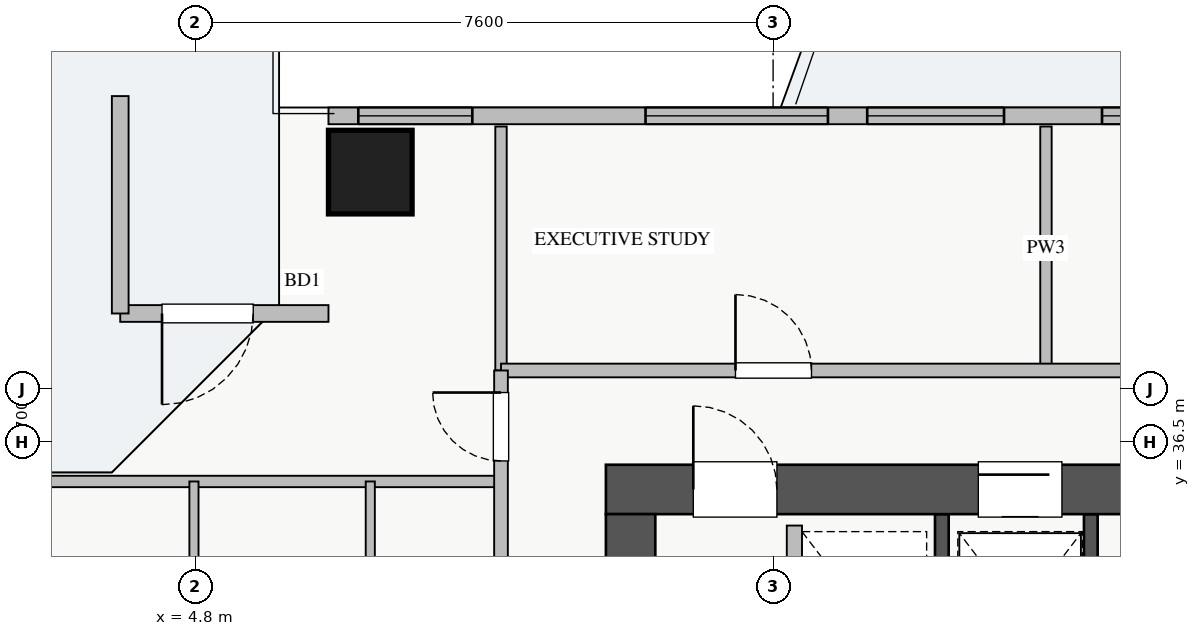
"""IFC4 building model, lengths in metres.
Left out: names, types, materials, properties, quantities, classifications, styles, units other than length and angle.
Written with IfcOpenShell. Run it as: python <this file> out.ifc"""

import sys

from ifc_helpers import new_model, si_unit, direction, frame, frame_2d, origin, origin_2d, place, context, subcontext, project, spatial, rectangle, extrude, source, transform, mapped, element, fill, save


model = new_model("IFC4")
c1 = context("Model", 3, precision=1e-05, world=origin(), true_north=direction((0.0, 1.0)))
c2 = subcontext(c1, "Body", "Model", "MODEL_VIEW")
j1 = project(units=[si_unit("LENGTHUNIT", "METRE"), si_unit("PLANEANGLEUNIT", "RADIAN")], contexts=[c1])
p1 = place(None, origin())
s1 = spatial("IfcSite", under=j1, at=p1, CompositionType="ELEMENT")
p2 = place(p1, origin())
s2 = spatial("IfcBuilding", under=s1, at=p2, CompositionType="ELEMENT")
p3 = place(p2, frame((0.0, 0.0, 132.75)))
s3 = spatial("IfcBuildingStorey", under=s2, at=p3, CompositionType="ELEMENT", Elevation=132.75)
for number, where, z_axis, x_axis in (
    (1, (14.62, 33.2, 0.0), (0.0, 0.0, 1.0), (0.0, 1.0, 0.0)),
    (2, (16.58, 33.2, 0.0), (0.0, 0.0, 1.0), (0.0, 1.0, 0.0)),
):
    element("IfcWall", number, at=place(p3, frame(where, z_axis=z_axis, x_axis=x_axis)), inside=s3, PredefinedType="SHEAR", context=c2, shape_type="SweptSolid", body=[
        extrude(rectangle(XDim=2.35, YDim=0.18, at=frame_2d((1.175, 0.0))), origin(), (0.0, 0.0, 1.0), 3.07),
    ])
p4 = place(p3, frame((10.2, 35.875, 0.0), z_axis=(0.0, 0.0, 1.0), x_axis=(1.0, 0.0, 0.0)))
e3 = element("IfcWall", 3, at=p4, inside=s3, PredefinedType="SHEAR", context=c2, shape_type="SweptSolid", body=[
    extrude(rectangle(XDim=17.6, YDim=0.65, at=frame_2d((8.8, 0.0))), origin(), (0.0, 0.0, 1.0), 3.25),
])
p5 = place(p4, frame((1.15, 0.0, 0.0)))
e4 = element("IfcOpeningElement", 4, at=p5, cuts=e3, PredefinedType="OPENING", context=c2, shape_type="SweptSolid", body=[
    extrude(rectangle(XDim=1.1, YDim=2.05, at=frame_2d((0.55, 1.025))), frame((0.0, 0.335, 0.0), z_axis=(0.0, -1.0, 0.0), x_axis=(1.0, 0.0, 0.0)), (0.0, 0.0, 1.0), 0.67),
])
p6 = place(p4, frame((8.3, 0.0, 0.0)))
e5 = element("IfcOpeningElement", 5, at=p6, cuts=e3, PredefinedType="OPENING", context=c2, shape_type="SweptSolid", body=[
    extrude(rectangle(XDim=1.1, YDim=2.05, at=frame_2d((0.55, 1.025))), frame((0.0, 0.335, 0.0), z_axis=(0.0, -1.0, 0.0), x_axis=(1.0, 0.0, 0.0)), (0.0, 0.0, 1.0), 0.67),
])
p7 = place(p4, frame((4.9, 0.0, 0.0)))
e6 = element("IfcOpeningElement", 6, at=p7, cuts=e3, PredefinedType="OPENING", context=c2, shape_type="SweptSolid", body=[
    extrude(rectangle(XDim=1.1, YDim=2.05, at=frame_2d((0.55, 1.025))), frame((0.0, 0.335, 0.0), z_axis=(0.0, -1.0, 0.0), x_axis=(1.0, 0.0, 0.0)), (0.0, 0.0, 1.0), 0.67),
])
p8 = place(p4, frame((14.74, 0.0, 0.0)))
e7 = element("IfcOpeningElement", 7, at=p8, cuts=e3, PredefinedType="OPENING", context=c2, shape_type="SweptSolid", body=[
    extrude(rectangle(XDim=1.0, YDim=2.05, at=frame_2d((0.5, 1.025))), frame((0.0, 0.335, 0.0), z_axis=(0.0, -1.0, 0.0), x_axis=(1.0, 0.0, 0.0)), (0.0, 0.0, 1.0), 0.67),
])
p9 = place(p4, frame((10.005, 0.0, 0.0)))
e8 = element("IfcOpeningElement", 8, at=p9, cuts=e3, PredefinedType="OPENING", context=c2, shape_type="SweptSolid", body=[
    extrude(rectangle(XDim=1.0, YDim=2.05, at=frame_2d((0.5, 1.025))), frame((0.0, 0.335, 0.0), z_axis=(0.0, -1.0, 0.0), x_axis=(1.0, 0.0, 0.0)), (0.0, 0.0, 1.0), 0.67),
])
p10 = place(p4, frame((11.55, 0.0, 0.0)))
e9 = element("IfcOpeningElement", 9, at=p10, cuts=e3, PredefinedType="OPENING", context=c2, shape_type="SweptSolid", body=[
    extrude(rectangle(XDim=1.0, YDim=2.05, at=frame_2d((0.5, 1.025))), frame((0.0, 0.335, 0.0), z_axis=(0.0, -1.0, 0.0), x_axis=(1.0, 0.0, 0.0)), (0.0, 0.0, 1.0), 0.67),
])
p11 = place(p4, frame((13.215, 0.0, 0.0)))
e10 = element("IfcOpeningElement", 10, at=p11, cuts=e3, PredefinedType="OPENING", context=c2, shape_type="SweptSolid", body=[
    extrude(rectangle(XDim=1.0, YDim=2.05, at=frame_2d((0.5, 1.025))), frame((0.0, 0.335, 0.0), z_axis=(0.0, -1.0, 0.0), x_axis=(1.0, 0.0, 0.0)), (0.0, 0.0, 1.0), 0.67),
])
p12 = place(p3, frame((10.525, 29.65, 0.0), z_axis=(0.0, 0.0, 1.0), x_axis=(0.0, 1.0, 0.0)))
e11 = element("IfcWall", 11, at=p12, inside=s3, PredefinedType="SHEAR", context=c2, shape_type="SweptSolid", body=[
    extrude(rectangle(XDim=5.9, YDim=0.65, at=frame_2d((2.95, 0.0))), origin(), (0.0, 0.0, 1.0), 3.25),
])
m1 = source(origin(), c2, "Body", "SweptSolid", [
    extrude(rectangle(XDim=1.1, YDim=1.1, at=origin_2d()), origin(), (0.0, 0.0, 1.0), 3.25),
])
p13 = place(p3, frame((7.1, 40.05, 0.0), z_axis=(0.0, 0.0, 1.0), x_axis=(1.0, 0.0, 0.0)))
e12 = element("IfcColumn", 12, at=p13, inside=s3, PredefinedType="COLUMN", context=c2, shape_type="MappedRepresentation", body=[
    mapped(m1, transform((0.0, 0.0, 0.0), x_axis=(1.0, 0.0, 0.0), y_axis=(0.0, 1.0, 0.0), z_axis=(0.0, 0.0, 1.0), scale=1.0)),
])
p14 = place(p3, frame((6.55, 40.79, 0.0), z_axis=(0.0, 0.0, 1.0), x_axis=(1.0, 0.0, 0.0)))
e13 = element("IfcWall", 13, at=p14, inside=s3, PredefinedType="STANDARD", context=c2, shape_type="SweptSolid", body=[
    extrude(rectangle(XDim=24.9, YDim=0.22, at=frame_2d((12.45, 0.0))), origin(), (0.0, 0.0, 1.0), 2.61),
])
p15 = place(p14, frame((13.3, 0.0, 0.0)))
e14 = element("IfcOpeningElement", 14, at=p15, cuts=e13, PredefinedType="OPENING", context=c2, shape_type="SweptSolid", body=[
    extrude(rectangle(XDim=1.2, YDim=2.1, at=frame_2d((0.6, 1.05))), frame((0.0, 0.12, 0.0), z_axis=(0.0, -1.0, 0.0), x_axis=(1.0, 0.0, 0.0)), (0.0, 0.0, 1.0), 0.24),
])
p16 = place(p14, frame((0.393, 0.0, 0.9)))
e15 = element("IfcOpeningElement", 15, at=p16, cuts=e13, PredefinedType="OPENING", context=c2, shape_type="SweptSolid", body=[
    extrude(rectangle(XDim=1.5, YDim=1.5, at=frame_2d((0.75, 0.75))), frame((0.0, 0.12, 0.0), z_axis=(0.0, -1.0, 0.0), x_axis=(1.0, 0.0, 0.0)), (0.0, 0.0, 1.0), 0.24),
])
p17 = place(p14, frame((7.088, 0.0, 0.9)))
e16 = element("IfcOpeningElement", 16, at=p17, cuts=e13, PredefinedType="OPENING", context=c2, shape_type="SweptSolid", body=[
    extrude(rectangle(XDim=1.8, YDim=1.5, at=frame_2d((0.9, 0.75))), frame((0.0, 0.12, 0.0), z_axis=(0.0, -1.0, 0.0), x_axis=(1.0, 0.0, 0.0)), (0.0, 0.0, 1.0), 0.24),
])
p18 = place(p14, frame((14.813, 0.0, 0.9)))
e17 = element("IfcOpeningElement", 17, at=p18, cuts=e13, PredefinedType="OPENING", context=c2, shape_type="SweptSolid", body=[
    extrude(rectangle(XDim=1.5, YDim=1.45, at=frame_2d((0.75, 0.725))), frame((0.0, 0.12, 0.0), z_axis=(0.0, -1.0, 0.0), x_axis=(1.0, 0.0, 0.0)), (0.0, 0.0, 1.0), 0.24),
])
p19 = place(p14, frame((20.738, 0.0, 0.9)))
e18 = element("IfcOpeningElement", 18, at=p19, cuts=e13, PredefinedType="OPENING", context=c2, shape_type="SweptSolid", body=[
    extrude(rectangle(XDim=2.1, YDim=1.48, at=frame_2d((1.05, 0.74))), frame((0.0, 0.12, 0.0), z_axis=(0.0, -1.0, 0.0), x_axis=(1.0, 0.0, 0.0)), (0.0, 0.0, 1.0), 0.24),
])
p20 = place(p14, frame((4.171, 0.0, 0.9)))
e19 = element("IfcOpeningElement", 19, at=p20, cuts=e13, PredefinedType="OPENING", context=c2, shape_type="SweptSolid", body=[
    extrude(rectangle(XDim=2.4, YDim=1.5, at=frame_2d((1.2, 0.75))), frame((0.0, 0.12, 0.0), z_axis=(0.0, -1.0, 0.0), x_axis=(1.0, 0.0, 0.0)), (0.0, 0.0, 1.0), 0.24),
])
p21 = place(p14, frame((10.177, 0.0, 0.9)))
e20 = element("IfcOpeningElement", 20, at=p21, cuts=e13, PredefinedType="OPENING", context=c2, shape_type="SweptSolid", body=[
    extrude(rectangle(XDim=2.4, YDim=1.5, at=frame_2d((1.2, 0.75))), frame((0.0, 0.12, 0.0), z_axis=(0.0, -1.0, 0.0), x_axis=(1.0, 0.0, 0.0)), (0.0, 0.0, 1.0), 0.24),
])
p22 = place(p3, frame((3.81, 38.19, 0.0), z_axis=(0.0, 0.0, 1.0), x_axis=(1.0, 0.0, 0.0)))
e21 = element("IfcWall", 21, at=p22, inside=s3, PredefinedType="STANDARD", context=c2, shape_type="SweptSolid", body=[
    extrude(rectangle(XDim=2.74, YDim=0.22, at=frame_2d((1.37, 0.0))), origin(), (0.0, 0.0, 1.0), 2.61),
])
p23 = place(p22, frame((0.55, 0.0, 0.0)))
e22 = element("IfcOpeningElement", 22, at=p23, cuts=e21, PredefinedType="OPENING", context=c2, shape_type="SweptSolid", body=[
    extrude(rectangle(XDim=1.2, YDim=2.1, at=frame_2d((0.6, 1.05))), frame((0.0, 0.12, 0.0), z_axis=(0.0, -1.0, 0.0), x_axis=(1.0, 0.0, 0.0)), (0.0, 0.0, 1.0), 0.24),
])
p24 = place(p3, frame((3.81, 38.19, 0.0), z_axis=(0.0, 0.0, 1.0), x_axis=(0.0, 1.0, 0.0)))
e23 = element("IfcWall", 23, at=p24, inside=s3, PredefinedType="STANDARD", context=c2, shape_type="SweptSolid", body=[
    extrude(rectangle(XDim=2.86, YDim=0.22, at=frame_2d((1.43, 0.0))), origin(), (0.0, 0.0, 1.0), 2.61),
])
p25 = place(p3, frame((12.68, 33.19, 0.0), z_axis=(0.0, 0.0, 1.0), x_axis=(0.0, 1.0, 0.0)))
e24 = element("IfcWall", 24, at=p25, inside=s3, PredefinedType="PARTITIONING", context=c2, shape_type="SweptSolid", body=[
    extrude(rectangle(XDim=2.21, YDim=0.2, at=frame_2d((1.105, 0.0))), origin(), (0.0, 0.0, 1.0), 3.07),
])
p26 = place(p3, frame((15.99, 37.44, 0.0), z_axis=(0.0, 0.0, 1.0), x_axis=(0.0, 1.0, 0.0)))
e25 = element("IfcWall", 25, at=p26, inside=s3, PredefinedType="PARTITIONING", context=c2, shape_type="SweptSolid", body=[
    extrude(rectangle(XDim=3.21, YDim=0.15, at=frame_2d((1.605, 0.0))), origin(), (0.0, 0.0, 1.0), 2.771),
])
p27 = place(p3, frame((8.82, 37.44, 0.0), z_axis=(0.0, 0.0, 1.0), x_axis=(0.0, 1.0, 0.0)))
e26 = element("IfcWall", 26, at=p27, inside=s3, PredefinedType="PARTITIONING", context=c2, shape_type="SweptSolid", body=[
    extrude(rectangle(XDim=3.21, YDim=0.15, at=frame_2d((1.605, 0.0))), origin(), (0.0, 0.0, 1.0), 3.07),
])
p28 = place(p3, frame((8.82, 37.44, 0.0), z_axis=(0.0, 0.0, 1.0), x_axis=(1.0, 0.0, 0.0)))
e27 = element("IfcWall", 27, at=p28, inside=s3, PredefinedType="PARTITIONING", context=c2, shape_type="SweptSolid", body=[
    extrude(rectangle(XDim=23.58, YDim=0.18, at=frame_2d((11.79, 0.0))), origin(), (0.0, 0.0, 1.0), 3.07),
])
p29 = place(p28, frame((3.085, 0.0, 0.0)))
e28 = element("IfcOpeningElement", 28, at=p29, cuts=e27, PredefinedType="OPENING", context=c2, shape_type="SweptSolid", body=[
    extrude(rectangle(XDim=1.0, YDim=2.05, at=frame_2d((0.5, 1.025))), frame((0.0, 0.1, 0.0), z_axis=(0.0, -1.0, 0.0), x_axis=(1.0, 0.0, 0.0)), (0.0, 0.0, 1.0), 0.2),
])
p30 = place(p28, frame((10.805, 0.0, 0.0)))
e29 = element("IfcOpeningElement", 29, at=p30, cuts=e27, PredefinedType="OPENING", context=c2, shape_type="SweptSolid", body=[
    extrude(rectangle(XDim=1.0, YDim=2.05, at=frame_2d((0.5, 1.025))), frame((0.0, 0.1, 0.0), z_axis=(0.0, -1.0, 0.0), x_axis=(1.0, 0.0, 0.0)), (0.0, 0.0, 1.0), 0.2),
])
p31 = place(p28, frame((18.8, 0.0, 0.0)))
e30 = element("IfcOpeningElement", 30, at=p31, cuts=e27, PredefinedType="OPENING", context=c2, shape_type="SweptSolid", body=[
    extrude(rectangle(XDim=1.0, YDim=2.05, at=frame_2d((0.5, 1.025))), frame((0.0, 0.1, 0.0), z_axis=(0.0, -1.0, 0.0), x_axis=(1.0, 0.0, 0.0)), (0.0, 0.0, 1.0), 0.2),
])
p32 = place(p3, frame((1.35, 35.98, 0.0), z_axis=(0.0, 0.0, 1.0), x_axis=(1.0, 0.0, 0.0)))
e31 = element("IfcWall", 31, at=p32, inside=s3, PredefinedType="PARTITIONING", context=c2, shape_type="SweptSolid", body=[
    extrude(rectangle(XDim=7.47, YDim=0.15, at=frame_2d((3.735, 0.0))), origin(), (0.0, 0.0, 1.0), 3.07),
])
p33 = place(p3, frame((4.78, 28.79, 0.0), z_axis=(0.0, 0.0, 1.0), x_axis=(0.0, 1.0, 0.0)))
e32 = element("IfcWall", 32, at=p33, inside=s3, PredefinedType="PLUMBINGWALL", context=c2, shape_type="SweptSolid", body=[
    extrude(rectangle(XDim=7.19, YDim=0.12, at=frame_2d((3.595, 0.0))), origin(), (0.0, 0.0, 1.0), 3.07),
])
p34 = place(p3, frame((7.1, 28.79, 0.0), z_axis=(0.0, 0.0, 1.0), x_axis=(0.0, 1.0, 0.0)))
e33 = element("IfcWall", 33, at=p34, inside=s3, PredefinedType="PLUMBINGWALL", context=c2, shape_type="SweptSolid", body=[
    extrude(rectangle(XDim=7.19, YDim=0.12, at=frame_2d((3.595, 0.0))), origin(), (0.0, 0.0, 1.0), 2.577),
])
p35 = place(p3, frame((8.82, 8.31, 0.0), z_axis=(0.0, 0.0, 1.0), x_axis=(0.0, 1.0, 0.0)))
e34 = element("IfcWall", 34, at=p35, inside=s3, PredefinedType="PARTITIONING", context=c2, shape_type="SweptSolid", body=[
    extrude(rectangle(XDim=29.13, YDim=0.18, at=frame_2d((14.565, 0.0))), origin(), (0.0, 0.0, 1.0), 3.07),
])
p36 = place(p35, frame((27.94, 0.0, 0.0)))
e35 = element("IfcOpeningElement", 35, at=p36, cuts=e34, PredefinedType="OPENING", context=c2, shape_type="SweptSolid", body=[
    extrude(rectangle(XDim=0.9, YDim=2.05, at=frame_2d((0.45, 1.025))), frame((0.0, 0.1, 0.0), z_axis=(0.0, -1.0, 0.0), x_axis=(1.0, 0.0, 0.0)), (0.0, 0.0, 1.0), 0.2),
])
p37 = place(p35, frame((0.24, 0.0, 0.0)))
e36 = element("IfcOpeningElement", 36, at=p37, cuts=e34, PredefinedType="OPENING", context=c2, shape_type="SweptSolid", body=[
    extrude(rectangle(XDim=0.9, YDim=2.05, at=frame_2d((0.45, 1.025))), frame((0.0, 0.1, 0.0), z_axis=(0.0, -1.0, 0.0), x_axis=(1.0, 0.0, 0.0)), (0.0, 0.0, 1.0), 0.2),
])
p38 = place(p35, frame((7.105, 0.0, 0.0)))
e37 = element("IfcOpeningElement", 37, at=p38, cuts=e34, PredefinedType="OPENING", context=c2, shape_type="SweptSolid", body=[
    extrude(rectangle(XDim=1.0, YDim=2.05, at=frame_2d((0.5, 1.025))), frame((0.0, 0.1, 0.0), z_axis=(0.0, -1.0, 0.0), x_axis=(1.0, 0.0, 0.0)), (0.0, 0.0, 1.0), 0.2),
])
p39 = place(p35, frame((16.475, 0.0, 0.0)))
e38 = element("IfcOpeningElement", 38, at=p39, cuts=e34, PredefinedType="OPENING", context=c2, shape_type="SweptSolid", body=[
    extrude(rectangle(XDim=1.0, YDim=2.05, at=frame_2d((0.5, 1.025))), frame((0.0, 0.1, 0.0), z_axis=(0.0, -1.0, 0.0), x_axis=(1.0, 0.0, 0.0)), (0.0, 0.0, 1.0), 0.2),
])
m2 = source(origin(), c2, "Body", "SweptSolid", [
    extrude(rectangle(XDim=1.5, YDim=1.5, at=frame_2d((0.75, 0.75))), frame((0.0, 0.03, 0.0), z_axis=(0.0, -1.0, 0.0), x_axis=(1.0, 0.0, 0.0)), (0.0, 0.0, 1.0), 0.06),
])
p40 = place(p16, origin())
e39 = element("IfcWindow", 39, at=p40, inside=s3, PartitioningType="TRIPLE_PANEL_VERTICAL", PredefinedType="WINDOW", context=c2, shape_type="MappedRepresentation", body=[
    mapped(m2, transform((0.0, 0.0, 0.0), x_axis=(1.0, 0.0, 0.0), y_axis=(0.0, 1.0, 0.0), z_axis=(0.0, 0.0, 1.0), scale=1.0)),
])
fill(e15, e39)
m3 = source(origin(), c2, "Body", "SweptSolid", [
    extrude(rectangle(XDim=1.8, YDim=1.5, at=frame_2d((0.9, 0.75))), frame((0.0, 0.03, 0.0), z_axis=(0.0, -1.0, 0.0), x_axis=(1.0, 0.0, 0.0)), (0.0, 0.0, 1.0), 0.06),
])
p41 = place(p17, origin())
e40 = element("IfcWindow", 40, at=p41, inside=s3, PartitioningType="DOUBLE_PANEL_VERTICAL", PredefinedType="WINDOW", context=c2, shape_type="MappedRepresentation", body=[
    mapped(m3, transform((0.0, 0.0, 0.0), x_axis=(1.0, 0.0, 0.0), y_axis=(0.0, 1.0, 0.0), z_axis=(0.0, 0.0, 1.0), scale=1.0)),
])
fill(e16, e40)
m4 = source(origin(), c2, "Body", "SweptSolid", [
    extrude(rectangle(XDim=1.2, YDim=2.1, at=frame_2d((0.6, 1.05))), frame((0.0, 0.025, 0.0), z_axis=(0.0, -1.0, 0.0), x_axis=(1.0, 0.0, 0.0)), (0.0, 0.0, 1.0), 0.05),
])
p42 = place(p23, frame((1.2, 0.0, 0.0), z_axis=(0.0, 0.0, 1.0), x_axis=(-1.0, 0.0, 0.0)))
e41 = element("IfcDoor", 41, at=p42, inside=s3, OperationType="SINGLE_SWING_LEFT", PredefinedType="DOOR", context=c2, shape_type="MappedRepresentation", body=[
    mapped(m4, transform((0.0, 0.0, 0.0), x_axis=(1.0, 0.0, 0.0), y_axis=(0.0, 1.0, 0.0), z_axis=(0.0, 0.0, 1.0), scale=1.0)),
])
fill(e22, e41)
m5 = source(origin(), c2, "Body", "SweptSolid", [
    extrude(rectangle(XDim=1.1, YDim=2.05, at=frame_2d((0.55, 1.025))), frame((0.0, 0.025, 0.0), z_axis=(0.0, -1.0, 0.0), x_axis=(1.0, 0.0, 0.0)), (0.0, 0.0, 1.0), 0.05),
])
p43 = place(p5, origin())
e42 = element("IfcDoor", 42, at=p43, inside=s3, OperationType="SINGLE_SWING_LEFT", PredefinedType="DOOR", context=c2, shape_type="MappedRepresentation", body=[
    mapped(m5, transform((0.0, 0.0, 0.0), x_axis=(1.0, 0.0, 0.0), y_axis=(0.0, 1.0, 0.0), z_axis=(0.0, 0.0, 1.0), scale=1.0)),
])
fill(e4, e42)
p44 = place(p7, origin())
e43 = element("IfcDoor", 43, at=p44, inside=s3, OperationType="SLIDING_TO_LEFT", PredefinedType="DOOR", context=c2, shape_type="MappedRepresentation", body=[
    mapped(m5, transform((0.0, 0.0, 0.0), x_axis=(1.0, 0.0, 0.0), y_axis=(0.0, 1.0, 0.0), z_axis=(0.0, 0.0, 1.0), scale=1.0)),
])
fill(e6, e43)
m6 = source(origin(), c2, "Body", "SweptSolid", [
    extrude(rectangle(XDim=1.0, YDim=2.05, at=frame_2d((0.5, 1.025))), frame((0.0, 0.025, 0.0), z_axis=(0.0, -1.0, 0.0), x_axis=(1.0, 0.0, 0.0)), (0.0, 0.0, 1.0), 0.05),
])
p45 = place(p29, origin())
e44 = element("IfcDoor", 44, at=p45, inside=s3, OperationType="SINGLE_SWING_LEFT", PredefinedType="DOOR", context=c2, shape_type="MappedRepresentation", body=[
    mapped(m6, transform((0.0, 0.0, 0.0), x_axis=(1.0, 0.0, 0.0), y_axis=(0.0, 1.0, 0.0), z_axis=(0.0, 0.0, 1.0), scale=1.0)),
])
fill(e28, e44)
m7 = source(origin(), c2, "Body", "SweptSolid", [
    extrude(rectangle(XDim=0.9, YDim=2.05, at=frame_2d((0.45, 1.025))), frame((0.0, 0.025, 0.0), z_axis=(0.0, -1.0, 0.0), x_axis=(1.0, 0.0, 0.0)), (0.0, 0.0, 1.0), 0.05),
])
p46 = place(p36, origin())
e45 = element("IfcDoor", 45, at=p46, inside=s3, OperationType="SINGLE_SWING_RIGHT", PredefinedType="DOOR", context=c2, shape_type="MappedRepresentation", body=[
    mapped(m7, transform((0.0, 0.0, 0.0), x_axis=(1.0, 0.0, 0.0), y_axis=(0.0, 1.0, 0.0), z_axis=(0.0, 0.0, 1.0), scale=1.0)),
])
fill(e35, e45)
m8 = source(origin(), c2, "Body", "SweptSolid", [
    extrude(rectangle(XDim=2.4, YDim=1.5, at=frame_2d((1.2, 0.75))), frame((0.0, 0.03, 0.0), z_axis=(0.0, -1.0, 0.0), x_axis=(1.0, 0.0, 0.0)), (0.0, 0.0, 1.0), 0.06),
])
p47 = place(p20, origin())
e46 = element("IfcWindow", 46, at=p47, inside=s3, PartitioningType="TRIPLE_PANEL_VERTICAL", PredefinedType="WINDOW", context=c2, shape_type="MappedRepresentation", body=[
    mapped(m8, transform((0.0, 0.0, 0.0), x_axis=(1.0, 0.0, 0.0), y_axis=(0.0, 1.0, 0.0), z_axis=(0.0, 0.0, 1.0), scale=1.0)),
])
fill(e19, e46)
p48 = place(p21, origin())
e47 = element("IfcWindow", 47, at=p48, inside=s3, PartitioningType="TRIPLE_PANEL_VERTICAL", PredefinedType="WINDOW", context=c2, shape_type="MappedRepresentation", body=[
    mapped(m8, transform((0.0, 0.0, 0.0), x_axis=(1.0, 0.0, 0.0), y_axis=(0.0, 1.0, 0.0), z_axis=(0.0, 0.0, 1.0), scale=1.0)),
])
fill(e20, e47)
save(model, sys.argv[1])
